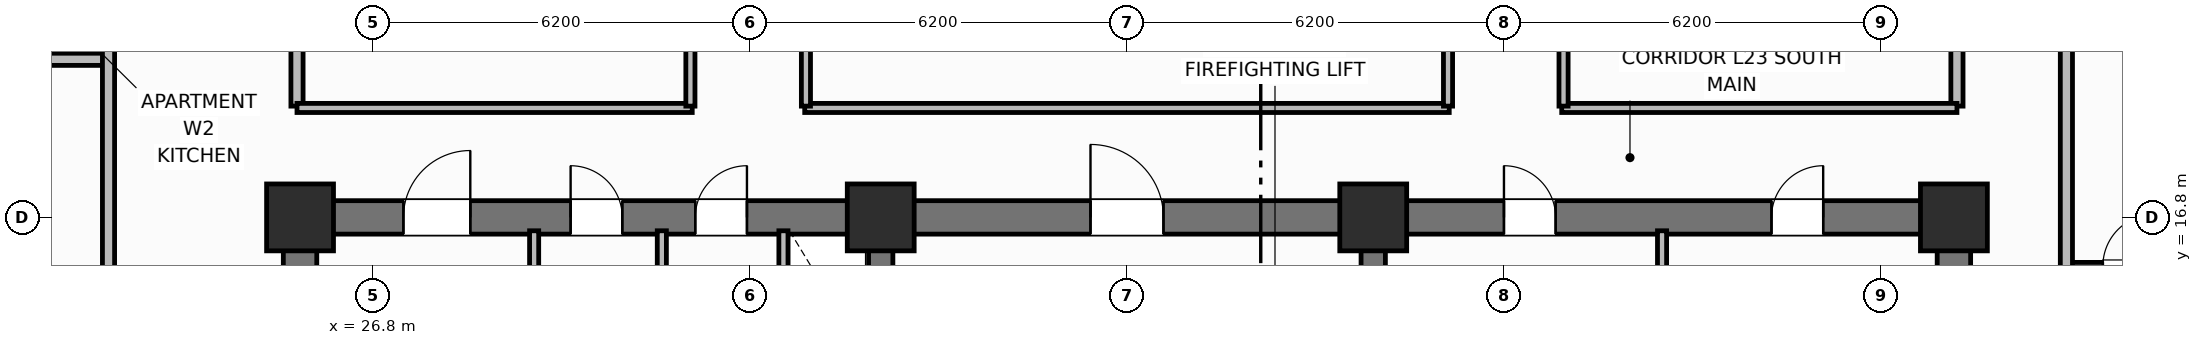
"""IFC4 building model, lengths in metres.
Left out: names, types, materials, properties, quantities, classifications, styles, units other than length and angle.
Written with IfcOpenShell. Run it as: python <this file> out.ifc"""

import sys

from ifc_helpers import new_model, si_unit, direction, frame, frame_2d, origin, origin_2d, place, context, subcontext, project, spatial, rectangle, extrude, element, fill, save


model = new_model("IFC4")
c1 = context("Model", 3, precision=1e-05, world=origin(), true_north=direction((0.0, 1.0)))
c2 = subcontext(c1, "Body", "Model", "MODEL_VIEW")
j1 = project(units=[si_unit("LENGTHUNIT", "METRE"), si_unit("PLANEANGLEUNIT", "RADIAN")], contexts=[c1])
p1 = place(None, origin())
s1 = spatial("IfcSite", under=j1, at=p1, CompositionType="ELEMENT")
p2 = place(p1, origin())
s2 = spatial("IfcBuilding", under=s1, at=p2, CompositionType="ELEMENT")
p3 = place(p2, frame((0.0, 0.0, 95.7)))
s3 = spatial("IfcBuildingStorey", under=s2, at=p3, CompositionType="ELEMENT", Elevation=95.7)
for number, where, z_axis, x_axis in (
    (1, (25.6, 10.875, 0.0), (0.0, 0.0, 1.0), (0.0, 1.0, 0.0)),
    (2, (52.8, 10.875, 0.0), (0.0, 0.0, 1.0), (0.0, 1.0, 0.0)),
):
    element("IfcWall", number, at=place(p3, frame(where, z_axis=z_axis, x_axis=x_axis)), inside=s3, PredefinedType="SHEAR", context=c2, shape_type="SweptSolid", body=[
        extrude(rectangle(XDim=5.65, YDim=0.55, at=frame_2d((2.825, 0.0))), origin(), (0.0, 0.0, 1.0), 3.7),
    ])
p4 = place(p3, frame((25.6, 16.8, 0.0), z_axis=(0.0, 0.0, 1.0), x_axis=(1.0, 0.0, 0.0)))
e3 = element("IfcWall", 3, at=p4, inside=s3, PredefinedType="SHEAR", context=c2, shape_type="SweptSolid", body=[
    extrude(rectangle(XDim=27.2, YDim=0.55, at=frame_2d((13.6, 0.0))), origin(), (0.0, 0.0, 1.0), 3.7),
])
p5 = place(p4, frame((1.7, 0.0, 0.0)))
e4 = element("IfcOpeningElement", 4, at=p5, cuts=e3, PredefinedType="OPENING", context=c2, shape_type="SweptSolid", body=[
    extrude(rectangle(XDim=1.1, YDim=2.15, at=frame_2d((0.55, 1.075))), frame((0.0, 0.285, 0.0), z_axis=(0.0, -1.0, 0.0), x_axis=(1.0, 0.0, 0.0)), (0.0, 0.0, 1.0), 0.57),
])
p6 = place(p4, frame((4.45, 0.0, 0.0)))
e5 = element("IfcOpeningElement", 5, at=p6, cuts=e3, PredefinedType="OPENING", context=c2, shape_type="SweptSolid", body=[
    extrude(rectangle(XDim=0.85, YDim=2.1, at=frame_2d((0.425, 1.05))), frame((0.0, 0.285, 0.0), z_axis=(0.0, -1.0, 0.0), x_axis=(1.0, 0.0, 0.0)), (0.0, 0.0, 1.0), 0.57),
])
p7 = place(p4, frame((6.5, 0.0, 0.0)))
e6 = element("IfcOpeningElement", 6, at=p7, cuts=e3, PredefinedType="OPENING", context=c2, shape_type="SweptSolid", body=[
    extrude(rectangle(XDim=0.85, YDim=2.1, at=frame_2d((0.425, 1.05))), frame((0.0, 0.285, 0.0), z_axis=(0.0, -1.0, 0.0), x_axis=(1.0, 0.0, 0.0)), (0.0, 0.0, 1.0), 0.57),
])
p8 = place(p4, frame((13.0, 0.0, 0.0)))
e7 = element("IfcOpeningElement", 7, at=p8, cuts=e3, PredefinedType="OPENING", context=c2, shape_type="SweptSolid", body=[
    extrude(rectangle(XDim=1.2, YDim=2.15, at=frame_2d((0.6, 1.075))), frame((0.0, 0.285, 0.0), z_axis=(0.0, -1.0, 0.0), x_axis=(1.0, 0.0, 0.0)), (0.0, 0.0, 1.0), 0.57),
])
p9 = place(p4, frame((19.8, 0.0, 0.0)))
e8 = element("IfcOpeningElement", 8, at=p9, cuts=e3, PredefinedType="OPENING", context=c2, shape_type="SweptSolid", body=[
    extrude(rectangle(XDim=0.85, YDim=2.1, at=frame_2d((0.425, 1.05))), frame((0.0, 0.285, 0.0), z_axis=(0.0, -1.0, 0.0), x_axis=(1.0, 0.0, 0.0)), (0.0, 0.0, 1.0), 0.57),
])
p10 = place(p4, frame((24.2, 0.0, 0.0)))
e9 = element("IfcOpeningElement", 9, at=p10, cuts=e3, PredefinedType="OPENING", context=c2, shape_type="SweptSolid", body=[
    extrude(rectangle(XDim=0.85, YDim=2.1, at=frame_2d((0.425, 1.05))), frame((0.0, 0.285, 0.0), z_axis=(0.0, -1.0, 0.0), x_axis=(1.0, 0.0, 0.0)), (0.0, 0.0, 1.0), 0.57),
])
for number, where, z_axis, x_axis in (
    (10, (35.15, 10.875, 0.0), (0.0, 0.0, 1.0), (0.0, 1.0, 0.0)),
    (11, (43.25, 10.875, 0.0), (0.0, 0.0, 1.0), (0.0, 1.0, 0.0)),
):
    element("IfcWall", number, at=place(p3, frame(where, z_axis=z_axis, x_axis=x_axis)), inside=s3, PredefinedType="SHEAR", context=c2, shape_type="SweptSolid", body=[
        extrude(rectangle(XDim=5.65, YDim=0.4, at=frame_2d((2.825, 0.0))), origin(), (0.0, 0.0, 1.0), 3.7),
    ])
for number, where, z_axis, x_axis in (
    (12, (25.6, 16.8, 0.0), (0.0, 0.0, 1.0), (1.0, 0.0, 0.0)),
    (13, (35.15, 16.8, 0.0), (0.0, 0.0, 1.0), (1.0, 0.0, 0.0)),
    (14, (43.25, 16.8, 0.0), (0.0, 0.0, 1.0), (1.0, 0.0, 0.0)),
    (15, (52.8, 16.8, 0.0), (0.0, 0.0, 1.0), (1.0, 0.0, 0.0)),
):
    element("IfcColumn", number, at=place(p3, frame(where, z_axis=z_axis, x_axis=x_axis)), inside=s3, PredefinedType="COLUMN", context=c2, shape_type="SweptSolid", body=[
        extrude(rectangle(XDim=1.1, YDim=1.1, at=origin_2d()), origin(), (0.0, 0.0, 1.0), 3.7),
    ])
for number, where, z_axis, x_axis in (
    (16, (29.45, 14.5, 0.0), (0.0, 0.0, 1.0), (0.0, 1.0, 0.0)),
    (17, (31.55, 14.5, 0.0), (0.0, 0.0, 1.0), (0.0, 1.0, 0.0)),
):
    element("IfcWall", number, at=place(p3, frame(where, z_axis=z_axis, x_axis=x_axis)), inside=s3, PredefinedType="PARTITIONING", context=c2, shape_type="SweptSolid", body=[
        extrude(rectangle(XDim=2.08, YDim=0.15, at=frame_2d((1.04, 0.0))), origin(), (0.0, 0.0, 1.0), 2.53),
    ])
p11 = place(p3, frame((33.55, 14.5, 0.0), z_axis=(0.0, 0.0, 1.0), x_axis=(0.0, 1.0, 0.0)))
e18 = element("IfcWall", 18, at=p11, inside=s3, PredefinedType="PARTITIONING", context=c2, shape_type="SweptSolid", body=[
    extrude(rectangle(XDim=2.08, YDim=0.15, at=frame_2d((1.04, 0.0))), origin(), (0.0, 0.0, 1.0), 2.53),
])
p12 = place(p11, frame((0.55, 0.0, 0.0)))
e19 = element("IfcOpeningElement", 19, at=p12, cuts=e18, PredefinedType="OPENING", context=c2, shape_type="SweptSolid", body=[
    extrude(rectangle(XDim=0.85, YDim=2.05, at=frame_2d((0.425, 1.025))), frame((0.0, 0.085, 0.0), z_axis=(0.0, -1.0, 0.0), x_axis=(1.0, 0.0, 0.0)), (0.0, 0.0, 1.0), 0.17),
])
p13 = place(p3, frame((48.0, 10.95, 0.0), z_axis=(0.0, 0.0, 1.0), x_axis=(0.0, 1.0, 0.0)))
e20 = element("IfcWall", 20, at=p13, inside=s3, PredefinedType="PARTITIONING", context=c2, shape_type="SweptSolid", body=[
    extrude(rectangle(XDim=5.63, YDim=0.15, at=frame_2d((2.815, 0.0))), origin(), (0.0, 0.0, 1.0), 2.53),
])
for number, where, z_axis, x_axis in (
    (21, (25.55, 18.63, 0.0), (0.0, 0.0, 1.0), (0.0, 1.0, 0.0)),
    (22, (52.85, 18.63, 0.0), (0.0, 0.0, 1.0), (0.0, 1.0, 0.0)),
):
    element("IfcWall", number, at=place(p3, frame(where, z_axis=z_axis, x_axis=x_axis)), inside=s3, PredefinedType="PARTITIONING", context=c2, shape_type="SweptSolid", body=[
        extrude(rectangle(XDim=19.14, YDim=0.2, at=frame_2d((9.57, 0.0))), origin(), (0.0, 0.0, 1.0), 2.53),
    ])
p14 = place(p3, frame((25.55, 18.6, 0.0), z_axis=(0.0, 0.0, 1.0), x_axis=(1.0, 0.0, 0.0)))
e23 = element("IfcWall", 23, at=p14, inside=s3, PredefinedType="PARTITIONING", context=c2, shape_type="SweptSolid", body=[
    extrude(rectangle(XDim=6.5, YDim=0.15, at=frame_2d((3.25, 0.0))), origin(), (0.0, 0.0, 1.0), 2.53),
])
p15 = place(p3, frame((33.9, 18.6, 0.0), z_axis=(0.0, 0.0, 1.0), x_axis=(1.0, 0.0, 0.0)))
e24 = element("IfcWall", 24, at=p15, inside=s3, PredefinedType="PARTITIONING", context=c2, shape_type="SweptSolid", body=[
    extrude(rectangle(XDim=10.6, YDim=0.15, at=frame_2d((5.3, 0.0))), origin(), (0.0, 0.0, 1.0), 2.53),
])
p16 = place(p3, frame((46.35, 18.6, 0.0), z_axis=(0.0, 0.0, 1.0), x_axis=(1.0, 0.0, 0.0)))
e25 = element("IfcWall", 25, at=p16, inside=s3, PredefinedType="PARTITIONING", context=c2, shape_type="SweptSolid", body=[
    extrude(rectangle(XDim=6.5, YDim=0.15, at=frame_2d((3.25, 0.0))), origin(), (0.0, 0.0, 1.0), 2.53),
])
p17 = place(p3, frame((32.02, 18.63, 0.0), z_axis=(0.0, 0.0, 1.0), x_axis=(0.0, 1.0, 0.0)))
e26 = element("IfcWall", 26, at=p17, inside=s3, PredefinedType="PARTITIONING", context=c2, shape_type="SweptSolid", body=[
    extrude(rectangle(XDim=19.14, YDim=0.15, at=frame_2d((9.57, 0.0))), origin(), (0.0, 0.0, 1.0), 2.53),
])
p18 = place(p17, frame((3.0, 0.0, 0.0)))
e27 = element("IfcOpeningElement", 27, at=p18, cuts=e26, PredefinedType="OPENING", context=c2, shape_type="SweptSolid", body=[
    extrude(rectangle(XDim=0.9, YDim=2.1, at=frame_2d((0.45, 1.05))), frame((0.0, 0.085, 0.0), z_axis=(0.0, -1.0, 0.0), x_axis=(1.0, 0.0, 0.0)), (0.0, 0.0, 1.0), 0.17),
])
p19 = place(p17, frame((11.5, 0.0, 0.0)))
e28 = element("IfcOpeningElement", 28, at=p19, cuts=e26, PredefinedType="OPENING", context=c2, shape_type="SweptSolid", body=[
    extrude(rectangle(XDim=0.9, YDim=2.1, at=frame_2d((0.45, 1.05))), frame((0.0, 0.085, 0.0), z_axis=(0.0, -1.0, 0.0), x_axis=(1.0, 0.0, 0.0)), (0.0, 0.0, 1.0), 0.17),
])
p20 = place(p3, frame((33.92, 18.63, 0.0), z_axis=(0.0, 0.0, 1.0), x_axis=(0.0, 1.0, 0.0)))
e29 = element("IfcWall", 29, at=p20, inside=s3, PredefinedType="PARTITIONING", context=c2, shape_type="SweptSolid", body=[
    extrude(rectangle(XDim=19.14, YDim=0.15, at=frame_2d((9.57, 0.0))), origin(), (0.0, 0.0, 1.0), 2.53),
])
p21 = place(p20, frame((2.4, 0.0, 0.0)))
e30 = element("IfcOpeningElement", 30, at=p21, cuts=e29, PredefinedType="OPENING", context=c2, shape_type="SweptSolid", body=[
    extrude(rectangle(XDim=0.9, YDim=2.1, at=frame_2d((0.45, 1.05))), frame((0.0, 0.085, 0.0), z_axis=(0.0, -1.0, 0.0), x_axis=(1.0, 0.0, 0.0)), (0.0, 0.0, 1.0), 0.17),
])
p22 = place(p3, frame((44.48, 18.63, 0.0), z_axis=(0.0, 0.0, 1.0), x_axis=(0.0, 1.0, 0.0)))
e31 = element("IfcWall", 31, at=p22, inside=s3, PredefinedType="PARTITIONING", context=c2, shape_type="SweptSolid", body=[
    extrude(rectangle(XDim=19.14, YDim=0.15, at=frame_2d((9.57, 0.0))), origin(), (0.0, 0.0, 1.0), 2.53),
])
p23 = place(p22, frame((9.847, 0.0, 0.0)))
e32 = element("IfcOpeningElement", 32, at=p23, cuts=e31, PredefinedType="OPENING", context=c2, shape_type="SweptSolid", body=[
    extrude(rectangle(XDim=0.9, YDim=2.1, at=frame_2d((0.45, 1.05))), frame((0.0, 0.085, 0.0), z_axis=(0.0, -1.0, 0.0), x_axis=(1.0, 0.0, 0.0)), (0.0, 0.0, 1.0), 0.17),
])
p24 = place(p3, frame((46.38, 18.63, 0.0), z_axis=(0.0, 0.0, 1.0), x_axis=(0.0, 1.0, 0.0)))
e33 = element("IfcWall", 33, at=p24, inside=s3, PredefinedType="PARTITIONING", context=c2, shape_type="SweptSolid", body=[
    extrude(rectangle(XDim=19.14, YDim=0.15, at=frame_2d((9.57, 0.0))), origin(), (0.0, 0.0, 1.0), 2.53),
])
p25 = place(p24, frame((5.5, 0.0, 0.0)))
e34 = element("IfcOpeningElement", 34, at=p25, cuts=e33, PredefinedType="OPENING", context=c2, shape_type="SweptSolid", body=[
    extrude(rectangle(XDim=1.0, YDim=2.15, at=frame_2d((0.5, 1.075))), frame((0.0, 0.085, 0.0), z_axis=(0.0, -1.0, 0.0), x_axis=(1.0, 0.0, 0.0)), (0.0, 0.0, 1.0), 0.17),
])
p26 = place(p3, frame((14.57, 19.4, 0.0), z_axis=(0.0, 0.0, 1.0), x_axis=(1.0, 0.0, 0.0)))
e35 = element("IfcWall", 35, at=p26, inside=s3, PredefinedType="PARTITIONING", context=c2, shape_type="SweptSolid", body=[
    extrude(rectangle(XDim=7.88, YDim=0.2, at=frame_2d((3.94, 0.0))), origin(), (0.0, 0.0, 1.0), 2.53),
])
p27 = place(p3, frame((22.45, 10.6, 0.0), z_axis=(0.0, 0.0, 1.0), x_axis=(0.0, 1.0, 0.0)))
e36 = element("IfcWall", 36, at=p27, inside=s3, PredefinedType="PARTITIONING", context=c2, shape_type="SweptSolid", body=[
    extrude(rectangle(XDim=35.2, YDim=0.2, at=frame_2d((17.6, 0.0))), origin(), (0.0, 0.0, 1.0), 2.53),
])
p28 = place(p27, frame((2.65, 0.0, 0.0)))
e37 = element("IfcOpeningElement", 37, at=p28, cuts=e36, PredefinedType="OPENING", context=c2, shape_type="SweptSolid", body=[
    extrude(rectangle(XDim=1.0, YDim=2.15, at=frame_2d((0.5, 1.075))), frame((0.0, 0.11, 0.0), z_axis=(0.0, -1.0, 0.0), x_axis=(1.0, 0.0, 0.0)), (0.0, 0.0, 1.0), 0.22),
])
p29 = place(p27, frame((10.81, 0.0, 0.0)))
e38 = element("IfcOpeningElement", 38, at=p29, cuts=e36, PredefinedType="OPENING", context=c2, shape_type="SweptSolid", body=[
    extrude(rectangle(XDim=1.0, YDim=2.15, at=frame_2d((0.5, 1.075))), frame((0.0, 0.11, 0.0), z_axis=(0.0, -1.0, 0.0), x_axis=(1.0, 0.0, 0.0)), (0.0, 0.0, 1.0), 0.22),
])
p30 = place(p27, frame((19.54, 0.0, 0.0)))
e39 = element("IfcOpeningElement", 39, at=p30, cuts=e36, PredefinedType="OPENING", context=c2, shape_type="SweptSolid", body=[
    extrude(rectangle(XDim=1.0, YDim=2.15, at=frame_2d((0.5, 1.075))), frame((0.0, 0.11, 0.0), z_axis=(0.0, -1.0, 0.0), x_axis=(1.0, 0.0, 0.0)), (0.0, 0.0, 1.0), 0.22),
])
p31 = place(p27, frame((26.95, 0.0, 0.0)))
e40 = element("IfcOpeningElement", 40, at=p31, cuts=e36, PredefinedType="OPENING", context=c2, shape_type="SweptSolid", body=[
    extrude(rectangle(XDim=1.0, YDim=2.15, at=frame_2d((0.5, 1.075))), frame((0.0, 0.11, 0.0), z_axis=(0.0, -1.0, 0.0), x_axis=(1.0, 0.0, 0.0)), (0.0, 0.0, 1.0), 0.22),
])
p32 = place(p3, frame((54.65, 16.0, 0.0), z_axis=(0.0, 0.0, 1.0), x_axis=(1.0, 0.0, 0.0)))
e41 = element("IfcWall", 41, at=p32, inside=s3, PredefinedType="PARTITIONING", context=c2, shape_type="SweptSolid", body=[
    extrude(rectangle(XDim=2.25, YDim=0.12, at=frame_2d((1.125, 0.0))), origin(), (0.0, 0.0, 1.0), 2.53),
])
p33 = place(p32, frame((0.6, 0.0, 0.0)))
e42 = element("IfcOpeningElement", 42, at=p33, cuts=e41, PredefinedType="OPENING", context=c2, shape_type="SweptSolid", body=[
    extrude(rectangle(XDim=0.85, YDim=2.1, at=frame_2d((0.425, 1.05))), frame((0.0, 0.07, 0.0), z_axis=(0.0, -1.0, 0.0), x_axis=(1.0, 0.0, 0.0)), (0.0, 0.0, 1.0), 0.14),
])
p34 = place(p3, frame((54.65, 10.6, 0.0), z_axis=(0.0, 0.0, 1.0), x_axis=(0.0, 1.0, 0.0)))
e43 = element("IfcWall", 43, at=p34, inside=s3, PredefinedType="PARTITIONING", context=c2, shape_type="SweptSolid", body=[
    extrude(rectangle(XDim=35.2, YDim=0.2, at=frame_2d((17.6, 0.0))), origin(), (0.0, 0.0, 1.0), 2.53),
])
p35 = place(p34, frame((2.65, 0.0, 0.0)))
e44 = element("IfcOpeningElement", 44, at=p35, cuts=e43, PredefinedType="OPENING", context=c2, shape_type="SweptSolid", body=[
    extrude(rectangle(XDim=1.0, YDim=2.15, at=frame_2d((0.5, 1.075))), frame((0.0, 0.11, 0.0), z_axis=(0.0, -1.0, 0.0), x_axis=(1.0, 0.0, 0.0)), (0.0, 0.0, 1.0), 0.22),
])
p36 = place(p34, frame((19.95, 0.0, 0.0)))
e45 = element("IfcOpeningElement", 45, at=p36, cuts=e43, PredefinedType="OPENING", context=c2, shape_type="SweptSolid", body=[
    extrude(rectangle(XDim=1.0, YDim=2.15, at=frame_2d((0.5, 1.075))), frame((0.0, 0.11, 0.0), z_axis=(0.0, -1.0, 0.0), x_axis=(1.0, 0.0, 0.0)), (0.0, 0.0, 1.0), 0.22),
])
p37 = place(p33, origin())
e46 = element("IfcDoor", 46, at=p37, inside=s3, OperationType="SINGLE_SWING_RIGHT", PredefinedType="DOOR", context=c2, shape_type="SweptSolid", body=[
    extrude(rectangle(XDim=0.85, YDim=2.1, at=frame_2d((0.425, 1.05))), frame((0.0, 0.025, 0.0), z_axis=(0.0, -1.0, 0.0), x_axis=(1.0, 0.0, 0.0)), (0.0, 0.0, 1.0), 0.05),
])
fill(e42, e46)
p38 = place(p5, origin())
e47 = element("IfcDoor", 47, at=p38, inside=s3, OperationType="SINGLE_SWING_RIGHT", PredefinedType="DOOR", context=c2, shape_type="SweptSolid", body=[
    extrude(rectangle(XDim=1.1, YDim=2.15, at=frame_2d((0.55, 1.075))), frame((0.0, 0.025, 0.0), z_axis=(0.0, -1.0, 0.0), x_axis=(1.0, 0.0, 0.0)), (0.0, 0.0, 1.0), 0.05),
])
fill(e4, e47)
p39 = place(p6, origin())
e48 = element("IfcDoor", 48, at=p39, inside=s3, OperationType="SINGLE_SWING_LEFT", PredefinedType="DOOR", context=c2, shape_type="SweptSolid", body=[
    extrude(rectangle(XDim=0.85, YDim=2.1, at=frame_2d((0.425, 1.05))), frame((0.0, 0.025, 0.0), z_axis=(0.0, -1.0, 0.0), x_axis=(1.0, 0.0, 0.0)), (0.0, 0.0, 1.0), 0.05),
])
fill(e5, e48)
p40 = place(p7, origin())
e49 = element("IfcDoor", 49, at=p40, inside=s3, OperationType="SINGLE_SWING_RIGHT", PredefinedType="DOOR", context=c2, shape_type="SweptSolid", body=[
    extrude(rectangle(XDim=0.85, YDim=2.1, at=frame_2d((0.425, 1.05))), frame((0.0, 0.025, 0.0), z_axis=(0.0, -1.0, 0.0), x_axis=(1.0, 0.0, 0.0)), (0.0, 0.0, 1.0), 0.05),
])
fill(e6, e49)
p41 = place(p8, origin())
e50 = element("IfcDoor", 50, at=p41, inside=s3, OperationType="SINGLE_SWING_LEFT", PredefinedType="DOOR", context=c2, shape_type="SweptSolid", body=[
    extrude(rectangle(XDim=1.2, YDim=2.15, at=frame_2d((0.6, 1.075))), frame((0.0, 0.025, 0.0), z_axis=(0.0, -1.0, 0.0), x_axis=(1.0, 0.0, 0.0)), (0.0, 0.0, 1.0), 0.05),
])
fill(e7, e50)
p42 = place(p9, origin())
e51 = element("IfcDoor", 51, at=p42, inside=s3, OperationType="SINGLE_SWING_LEFT", PredefinedType="DOOR", context=c2, shape_type="SweptSolid", body=[
    extrude(rectangle(XDim=0.85, YDim=2.1, at=frame_2d((0.425, 1.05))), frame((0.0, 0.025, 0.0), z_axis=(0.0, -1.0, 0.0), x_axis=(1.0, 0.0, 0.0)), (0.0, 0.0, 1.0), 0.05),
])
fill(e8, e51)
p43 = place(p10, origin())
e52 = element("IfcDoor", 52, at=p43, inside=s3, OperationType="SINGLE_SWING_RIGHT", PredefinedType="DOOR", context=c2, shape_type="SweptSolid", body=[
    extrude(rectangle(XDim=0.85, YDim=2.1, at=frame_2d((0.425, 1.05))), frame((0.0, 0.025, 0.0), z_axis=(0.0, -1.0, 0.0), x_axis=(1.0, 0.0, 0.0)), (0.0, 0.0, 1.0), 0.05),
])
fill(e9, e52)
save(model, sys.argv[1])
